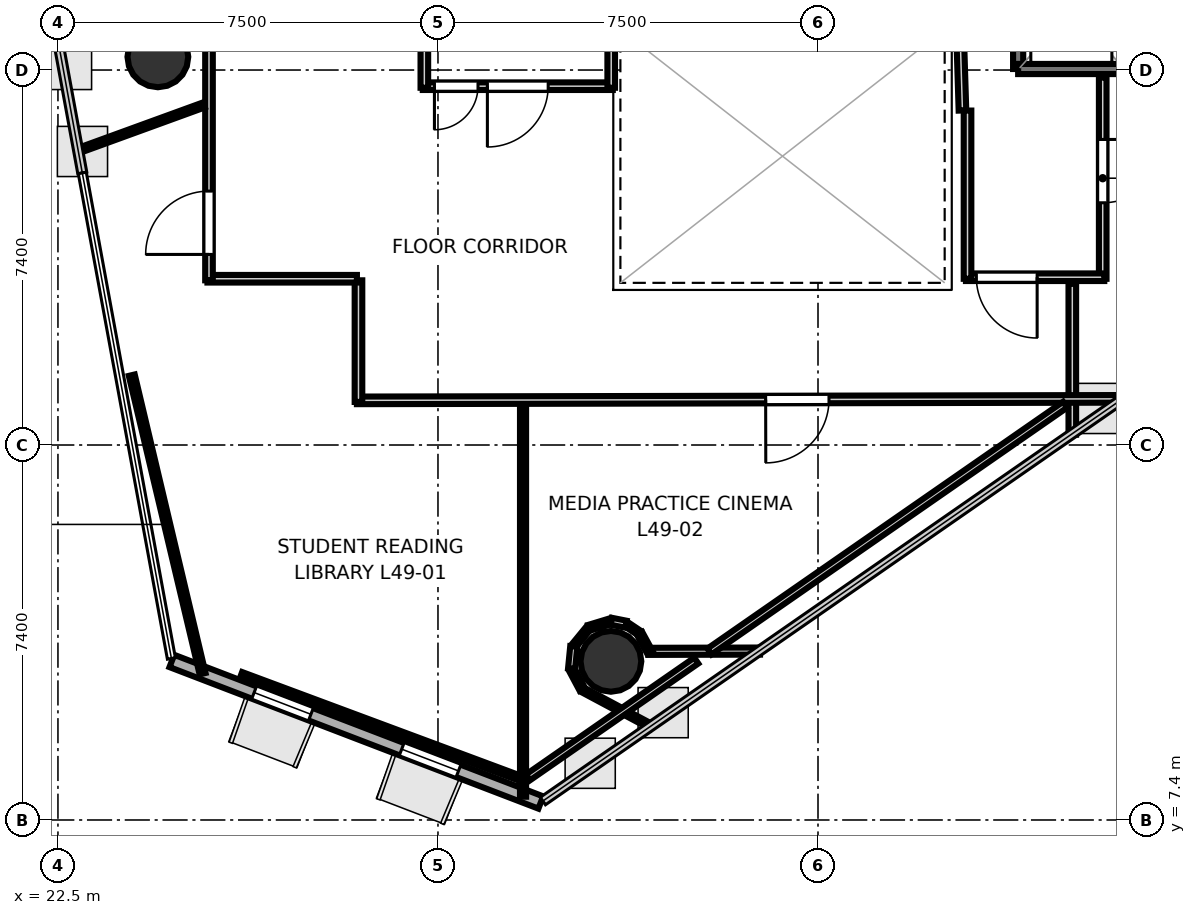
"""IFC4 building model, lengths in metres.
Left out: names, types, materials, properties, quantities, classifications, styles, units other than length and angle.
Written with IfcOpenShell. Run it as: python <this file> out.ifc"""

import sys

from ifc_helpers import new_model, si_unit, direction, frame, frame_2d, origin, origin_2d, place, context, subcontext, project, spatial, rectangle, hollow_circle, extrude, element, fill, save


model = new_model("IFC4")
c1 = context("Model", 3, precision=1e-05, world=origin(), true_north=direction((0.0, 1.0)))
c2 = subcontext(c1, "Body", "Model", "MODEL_VIEW")
j1 = project(units=[si_unit("LENGTHUNIT", "METRE"), si_unit("PLANEANGLEUNIT", "RADIAN")], contexts=[c1])
p1 = place(None, origin())
s1 = spatial("IfcSite", under=j1, at=p1, CompositionType="ELEMENT")
p2 = place(p1, origin())
s2 = spatial("IfcBuilding", under=s1, at=p2, CompositionType="ELEMENT")
p3 = place(p2, frame((0.0, 0.0, 192.9)))
s3 = spatial("IfcBuildingStorey", under=s2, at=p3, CompositionType="ELEMENT", Elevation=192.9)
for number, where, z_axis, x_axis in (
    (1, (24.472, 22.46, 0.0), (0.0, 0.0, 1.0), (1.0, 0.0, 0.0)),
    (2, (33.413, 10.531, 0.0), (0.0, 0.0, 1.0), (1.0, 0.0, 0.0)),
):
    element("IfcColumn", number, at=place(p3, frame(where, z_axis=z_axis, x_axis=x_axis)), inside=s3, PredefinedType="COLUMN", context=c2, shape_type="SweptSolid", body=[
        extrude(hollow_circle(Radius=0.6, WallThickness=0.03, at=origin_2d()), origin(), (0.0, 0.0, 1.0), 3.7),
    ])
p4 = place(p3, frame((24.748, 10.538, 0.0), z_axis=(0.0, 0.0, 1.0), x_axis=(0.933674423382, -0.358122983237, 0.0)))
e3 = element("IfcWall", 3, at=p4, inside=s3, PredefinedType="SOLIDWALL", context=c2, shape_type="SweptSolid", body=[
    extrude(rectangle(XDim=7.798, YDim=0.26, at=frame_2d((3.899, 0.0))), origin(), (0.0, 0.0, 1.0), 3.52),
])
p5 = place(p4, frame((1.74, 0.0, 0.9)))
e4 = element("IfcOpeningElement", 4, at=p5, cuts=e3, PredefinedType="OPENING", context=c2, shape_type="SweptSolid", body=[
    extrude(rectangle(XDim=1.2, YDim=2.0, at=frame_2d((0.6, 1.0))), frame((0.0, 0.14, 0.0), z_axis=(0.0, -1.0, 0.0), x_axis=(1.0, 0.0, 0.0)), (0.0, 0.0, 1.0), 0.28),
])
p6 = place(p4, frame((4.859, 0.0, 0.9)))
e5 = element("IfcOpeningElement", 5, at=p6, cuts=e3, PredefinedType="OPENING", context=c2, shape_type="SweptSolid", body=[
    extrude(rectangle(XDim=1.2, YDim=2.0, at=frame_2d((0.6, 1.0))), frame((0.0, 0.14, 0.0), z_axis=(0.0, -1.0, 0.0), x_axis=(1.0, 0.0, 0.0)), (0.0, 0.0, 1.0), 0.28),
])
p7 = place(p3, frame((41.45, 22.22, 0.0), z_axis=(0.0, 0.0, 1.0), x_axis=(0.0, 1.0, 0.0)))
e6 = element("IfcWall", 6, at=p7, inside=s3, PredefinedType="SOLIDWALL", context=c2, shape_type="SweptSolid", body=[
    extrude(rectangle(XDim=2.36, YDim=0.2, at=frame_2d((1.18, 0.0))), origin(), (0.0, 0.0, 1.0), 3.52),
])
p8 = place(p3, frame((41.45, 22.22, 0.0), z_axis=(0.0, 0.0, 1.0), x_axis=(1.0, 0.0, 0.0)))
e7 = element("IfcWall", 7, at=p8, inside=s3, PredefinedType="SOLIDWALL", context=c2, shape_type="SweptSolid", body=[
    extrude(rectangle(XDim=2.1, YDim=0.2, at=frame_2d((1.05, 0.0))), origin(), (0.0, 0.0, 1.0), 3.52),
])
p9 = place(p3, frame((33.45, 21.881, 0.0), z_axis=(0.0, 0.0, 1.0), x_axis=(-1.0, 0.0, 0.0)))
e8 = element("IfcWall", 8, at=p9, inside=s3, PredefinedType="PARTITIONING", context=c2, shape_type="SweptSolid", body=[
    extrude(rectangle(XDim=3.75, YDim=0.15, at=frame_2d((1.875, 0.0))), origin(), (0.0, 0.0, 1.0), 2.84),
])
p10 = place(p9, frame((1.275, 0.0, 0.0)))
e9 = element("IfcOpeningElement", 9, at=p10, cuts=e8, PredefinedType="OPENING", context=c2, shape_type="SweptSolid", body=[
    extrude(rectangle(XDim=1.2, YDim=2.15, at=frame_2d((0.6, 1.075))), frame((0.0, 0.085, 0.0), z_axis=(0.0, -1.0, 0.0), x_axis=(1.0, 0.0, 0.0)), (0.0, 0.0, 1.0), 0.17),
])
p11 = place(p9, frame((2.66, 0.0, 0.0)))
e10 = element("IfcOpeningElement", 10, at=p11, cuts=e8, PredefinedType="OPENING", context=c2, shape_type="SweptSolid", body=[
    extrude(rectangle(XDim=0.86, YDim=2.05, at=frame_2d((0.43, 1.025))), frame((0.0, 0.085, 0.0), z_axis=(0.0, -1.0, 0.0), x_axis=(1.0, 0.0, 0.0)), (0.0, 0.0, 1.0), 0.17),
])
for number, where, z_axis, x_axis in (
    (11, (29.731, 21.85, 0.0), (0.0, 0.0, 1.0), (0.0, 1.0, 0.0)),
    (12, (33.419, 24.542, 0.0), (0.0, 0.0, 1.0), (0.0, -1.0, 0.0)),
):
    element("IfcWall", number, at=place(p3, frame(where, z_axis=z_axis, x_axis=x_axis)), inside=s3, PredefinedType="PARTITIONING", context=c2, shape_type="SweptSolid", body=[
        extrude(rectangle(XDim=2.692, YDim=0.15, at=frame_2d((1.346, 0.0))), origin(), (0.0, 0.0, 1.0), 2.84),
    ])
p12 = place(p3, frame((40.351, 21.401, 0.0), z_axis=(0.0, 0.0, 1.0), x_axis=(-0.031058045979, 0.999517582527, 0.0)))
e13 = element("IfcWall", 13, at=p12, inside=s3, PredefinedType="PARTITIONING", context=c2, shape_type="SweptSolid", body=[
    extrude(rectangle(XDim=1.682, YDim=0.15, at=frame_2d((0.841, 0.0))), origin(), (0.0, 0.0, 1.0), 2.84),
])
p13 = place(p3, frame((43.119, 22.05, 0.0), z_axis=(0.0, 0.0, 1.0), x_axis=(0.0, -1.0, 0.0)))
e14 = element("IfcWall", 14, at=p13, inside=s3, PredefinedType="PARTITIONING", context=c2, shape_type="SweptSolid", body=[
    extrude(rectangle(XDim=3.97, YDim=0.15, at=frame_2d((1.985, 0.0))), origin(), (0.0, 0.0, 1.0), 2.84),
])
p14 = place(p13, frame((1.22, 0.0, 0.0)))
e15 = element("IfcOpeningElement", 15, at=p14, cuts=e14, PredefinedType="OPENING", context=c2, shape_type="SweptSolid", body=[
    extrude(rectangle(XDim=1.25, YDim=2.2, at=frame_2d((0.625, 1.1))), frame((0.0, 0.085, 0.0), z_axis=(0.0, -1.0, 0.0), x_axis=(1.0, 0.0, 0.0)), (0.0, 0.0, 1.0), 0.17),
])
p15 = place(p3, frame((43.15, 18.111, 0.0), z_axis=(0.0, 0.0, 1.0), x_axis=(-1.0, 0.0, 0.0)))
e16 = element("IfcWall", 16, at=p15, inside=s3, PredefinedType="PARTITIONING", context=c2, shape_type="SweptSolid", body=[
    extrude(rectangle(XDim=2.73, YDim=0.15, at=frame_2d((1.365, 0.0))), origin(), (0.0, 0.0, 1.0), 2.84),
])
p16 = place(p15, frame((1.325, 0.0, 0.0)))
e17 = element("IfcOpeningElement", 17, at=p16, cuts=e16, PredefinedType="OPENING", context=c2, shape_type="SweptSolid", body=[
    extrude(rectangle(XDim=1.2, YDim=2.15, at=frame_2d((0.6, 1.075))), frame((0.0, 0.085, 0.0), z_axis=(0.0, -1.0, 0.0), x_axis=(1.0, 0.0, 0.0)), (0.0, 0.0, 1.0), 0.17),
])
p17 = place(p3, frame((40.451, 18.08, 0.0), z_axis=(0.0, 0.0, 1.0), x_axis=(0.0, 1.0, 0.0)))
e18 = element("IfcWall", 18, at=p17, inside=s3, PredefinedType="PARTITIONING", context=c2, shape_type="SweptSolid", body=[
    extrude(rectangle(XDim=3.32, YDim=0.15, at=frame_2d((1.66, 0.0))), origin(), (0.0, 0.0, 1.0), 2.84),
])
p18 = place(p3, frame((42.519, 17.98, 0.0), z_axis=(0.0, 0.0, 1.0), x_axis=(0.0, -1.0, 0.0)))
e19 = element("IfcWall", 19, at=p18, inside=s3, PredefinedType="PARTITIONING", context=c2, shape_type="SweptSolid", body=[
    extrude(rectangle(XDim=2.977, YDim=0.15, at=frame_2d((1.488, 0.0))), origin(), (0.0, 0.0, 1.0), 2.84),
])
p19 = place(p3, frame((43.53, 15.711, 0.0), z_axis=(0.0, 0.0, 1.0), x_axis=(-0.999998062252, -0.00196862718, 0.0)))
e20 = element("IfcWall", 20, at=p19, inside=s3, PredefinedType="PARTITIONING", context=c2, shape_type="SweptSolid", body=[
    extrude(rectangle(XDim=15.13, YDim=0.15, at=frame_2d((7.565, 0.0))), origin(), (0.0, 0.0, 1.0), 2.84),
])
p20 = place(p19, frame((5.813, 0.0, 0.0)))
e21 = element("IfcOpeningElement", 21, at=p20, cuts=e20, PredefinedType="OPENING", context=c2, shape_type="SweptSolid", body=[
    extrude(rectangle(XDim=1.25, YDim=2.2, at=frame_2d((0.625, 1.1))), frame((0.0, 0.085, 0.0), z_axis=(0.0, -1.0, 0.0), x_axis=(1.0, 0.0, 0.0)), (0.0, 0.0, 1.0), 0.17),
])
p21 = place(p3, frame((28.431, 15.65, 0.0), z_axis=(0.0, 0.0, 1.0), x_axis=(0.0, 1.0, 0.0)))
e22 = element("IfcWall", 22, at=p21, inside=s3, PredefinedType="PARTITIONING", context=c2, shape_type="SweptSolid", body=[
    extrude(rectangle(XDim=2.4, YDim=0.15, at=frame_2d((1.2, 0.0))), origin(), (0.0, 0.0, 1.0), 2.84),
])
p22 = place(p3, frame((28.4, 18.081, 0.0), z_axis=(0.0, 0.0, 1.0), x_axis=(-1.0, 0.0, 0.0)))
e23 = element("IfcWall", 23, at=p22, inside=s3, PredefinedType="PARTITIONING", context=c2, shape_type="SweptSolid", body=[
    extrude(rectangle(XDim=2.95, YDim=0.15, at=frame_2d((1.475, 0.0))), origin(), (0.0, 0.0, 1.0), 2.84),
])
p23 = place(p3, frame((25.481, 18.05, 0.0), z_axis=(0.0, 0.0, 1.0), x_axis=(0.0, 1.0, 0.0)))
e24 = element("IfcWall", 24, at=p23, inside=s3, PredefinedType="PARTITIONING", context=c2, shape_type="SweptSolid", body=[
    extrude(rectangle(XDim=18.219, YDim=0.15, at=frame_2d((9.109, 0.0))), origin(), (0.0, 0.0, 1.0), 2.84),
])
p24 = place(p23, frame((0.511, 0.0, 0.0)))
e25 = element("IfcOpeningElement", 25, at=p24, cuts=e24, PredefinedType="OPENING", context=c2, shape_type="SweptSolid", body=[
    extrude(rectangle(XDim=1.25, YDim=2.2, at=frame_2d((0.625, 1.1))), frame((0.0, 0.085, 0.0), z_axis=(0.0, -1.0, 0.0), x_axis=(1.0, 0.0, 0.0)), (0.0, 0.0, 1.0), 0.17),
])
p25 = place(p23, frame((10.07, 0.0, 0.0)))
e26 = element("IfcOpeningElement", 26, at=p25, cuts=e24, PredefinedType="OPENING", context=c2, shape_type="SweptSolid", body=[
    extrude(rectangle(XDim=0.9, YDim=2.1, at=frame_2d((0.45, 1.05))), frame((0.0, 0.085, 0.0), z_axis=(0.0, -1.0, 0.0), x_axis=(1.0, 0.0, 0.0)), (0.0, 0.0, 1.0), 0.17),
])
p26 = place(p3, frame((25.354, 10.287, 0.0), z_axis=(0.0, 0.0, 1.0), x_axis=(-0.230780881634, 0.973005747502, 0.0)))
e27 = element("IfcWall", 27, at=p26, inside=s3, PredefinedType="PARTITIONING", context=c2, shape_type="SweptSolid", body=[
    extrude(rectangle(XDim=6.054, YDim=0.12, at=frame_2d((3.027, 0.0))), origin(), (0.0, 0.0, 1.0), 2.84),
])
p27 = place(p3, frame((22.881, 20.601, 0.0), z_axis=(0.0, 0.0, 1.0), x_axis=(0.939683512966, 0.342045165819, 0.0)))
e28 = element("IfcWall", 28, at=p27, inside=s3, PredefinedType="PARTITIONING", context=c2, shape_type="SweptSolid", body=[
    extrude(rectangle(XDim=2.66, YDim=0.105, at=frame_2d((1.33, 0.0))), origin(), (0.0, 0.0, 1.0), 2.84),
])
p28 = place(p3, frame((31.679, 15.573, 0.0), z_axis=(0.0, 0.0, 1.0), x_axis=(0.0, -1.0, 0.0)))
e29 = element("IfcWall", 29, at=p28, inside=s3, PredefinedType="PARTITIONING", context=c2, shape_type="SweptSolid", body=[
    extrude(rectangle(XDim=7.713, YDim=0.12, at=frame_2d((3.856, 0.0))), origin(), (0.0, 0.0, 1.0), 2.84),
])
p29 = place(p3, frame((31.721, 8.186, 0.0), z_axis=(0.0, 0.0, 1.0), x_axis=(-0.937280495086, 0.348576065631, 0.0)))
e30 = element("IfcWall", 30, at=p29, inside=s3, PredefinedType="PARTITIONING", context=c2, shape_type="SweptSolid", body=[
    extrude(rectangle(XDim=5.979, YDim=0.105, at=frame_2d((2.99, 0.0))), origin(), (0.0, 0.0, 1.0), 2.84),
])
p30 = place(p3, frame((36.355, 10.733, 0.0), z_axis=(0.0, 0.0, 1.0), x_axis=(-0.999997026912, -0.002438476457, 0.0)))
e31 = element("IfcWall", 31, at=p30, inside=s3, PredefinedType="PARTITIONING", context=c2, shape_type="SweptSolid", body=[
    extrude(rectangle(XDim=2.203, YDim=0.14, at=frame_2d((1.101, 0.0))), origin(), (0.0, 0.0, 1.0), 2.84),
])
p31 = place(p3, frame((34.18, 10.712, 0.0), z_axis=(0.0, 0.0, 1.0), x_axis=(-0.47901386463, 0.877807335064, 0.0)))
e32 = element("IfcWall", 32, at=p31, inside=s3, PredefinedType="PARTITIONING", context=c2, shape_type="SweptSolid", body=[
    extrude(rectangle(XDim=0.423, YDim=0.12, at=frame_2d((0.211, 0.0))), origin(), (0.0, 0.0, 1.0), 2.84),
])
p32 = place(p3, frame((33.968, 11.094, 0.0), z_axis=(0.0, 0.0, 1.0), x_axis=(-0.831542792322, 0.555460695763, 0.0)))
e33 = element("IfcWall", 33, at=p32, inside=s3, PredefinedType="PARTITIONING", context=c2, shape_type="SweptSolid", body=[
    extrude(rectangle(XDim=0.296, YDim=0.105, at=frame_2d((0.148, 0.0))), origin(), (0.0, 0.0, 1.0), 2.84),
])
p33 = place(p3, frame((33.71, 11.264, 0.0), z_axis=(0.0, 0.0, 1.0), x_axis=(-0.980958660601, 0.194216647569, 0.0)))
e34 = element("IfcWall", 34, at=p33, inside=s3, PredefinedType="PARTITIONING", context=c2, shape_type="SweptSolid", body=[
    extrude(rectangle(XDim=0.297, YDim=0.14, at=frame_2d((0.148, 0.0))), origin(), (0.0, 0.0, 1.0), 2.84),
])
p34 = place(p3, frame((33.404, 11.321, 0.0), z_axis=(0.0, 0.0, 1.0), x_axis=(-0.9569080268, -0.290391164202, 0.0)))
e35 = element("IfcWall", 35, at=p34, inside=s3, PredefinedType="PARTITIONING", context=c2, shape_type="SweptSolid", body=[
    extrude(rectangle(XDim=0.441, YDim=0.12, at=frame_2d((0.221, 0.0))), origin(), (0.0, 0.0, 1.0), 2.84),
])
p35 = place(p3, frame((32.967, 11.183, 0.0), z_axis=(0.0, 0.0, 1.0), x_axis=(-0.634231799198, -0.773142952426, 0.0)))
e36 = element("IfcWall", 36, at=p35, inside=s3, PredefinedType="PARTITIONING", context=c2, shape_type="SweptSolid", body=[
    extrude(rectangle(XDim=0.441, YDim=0.105, at=frame_2d((0.221, 0.0))), origin(), (0.0, 0.0, 1.0), 2.84),
])
p36 = place(p3, frame((32.68, 10.825, 0.0), z_axis=(0.0, 0.0, 1.0), x_axis=(-0.097915215421, -0.995194760129, 0.0)))
e37 = element("IfcWall", 37, at=p36, inside=s3, PredefinedType="PARTITIONING", context=c2, shape_type="SweptSolid", body=[
    extrude(rectangle(XDim=0.441, YDim=0.14, at=frame_2d((0.221, 0.0))), origin(), (0.0, 0.0, 1.0), 2.84),
])
p37 = place(p3, frame((32.64, 10.368, 0.0), z_axis=(0.0, 0.0, 1.0), x_axis=(0.471392110461, -0.881923737177, 0.0)))
e38 = element("IfcWall", 38, at=p37, inside=s3, PredefinedType="PARTITIONING", context=c2, shape_type="SweptSolid", body=[
    extrude(rectangle(XDim=0.441, YDim=0.12, at=frame_2d((0.221, 0.0))), origin(), (0.0, 0.0, 1.0), 2.84),
])
p38 = place(p3, frame((32.861, 9.966, 0.0), z_axis=(0.0, 0.0, 1.0), x_axis=(0.881895233193, -0.471445434459, 0.0)))
e39 = element("IfcWall", 39, at=p38, inside=s3, PredefinedType="PARTITIONING", context=c2, shape_type="SweptSolid", body=[
    extrude(rectangle(XDim=1.537, YDim=0.105, at=frame_2d((0.769, 0.0))), origin(), (0.0, 0.0, 1.0), 2.84),
])
p39 = place(p3, frame((35.097, 10.545, 0.0), z_axis=(0.0, 0.0, 1.0), x_axis=(-0.821611206255, -0.570048266164, 0.0)))
e40 = element("IfcWall", 40, at=p39, inside=s3, PredefinedType="PARTITIONING", context=c2, shape_type="SweptSolid", body=[
    extrude(rectangle(XDim=4.042, YDim=0.14, at=frame_2d((2.021, 0.0))), origin(), (0.0, 0.0, 1.0), 2.84),
])
p40 = place(p3, frame((42.377, 15.595, 0.0), z_axis=(0.0, 0.0, 1.0), x_axis=(-0.821614609727, -0.570043360704, 0.0)))
e41 = element("IfcWall", 41, at=p40, inside=s3, PredefinedType="PARTITIONING", context=c2, shape_type="SweptSolid", body=[
    extrude(rectangle(XDim=8.543, YDim=0.14, at=frame_2d((4.271, 0.0))), origin(), (0.0, 0.0, 1.0), 2.84),
])
p41 = place(p10, origin())
e42 = element("IfcDoor", 42, at=p41, inside=s3, OperationType="SINGLE_SWING_RIGHT", PredefinedType="DOOR", context=c2, shape_type="SweptSolid", body=[
    extrude(rectangle(XDim=1.2, YDim=2.15, at=frame_2d((0.6, 1.075))), frame((0.0, 0.025, 0.0), z_axis=(0.0, -1.0, 0.0), x_axis=(1.0, 0.0, 0.0)), (0.0, 0.0, 1.0), 0.05),
])
fill(e9, e42)
p42 = place(p16, origin())
e43 = element("IfcDoor", 43, at=p42, inside=s3, OperationType="SINGLE_SWING_LEFT", PredefinedType="DOOR", context=c2, shape_type="SweptSolid", body=[
    extrude(rectangle(XDim=1.2, YDim=2.15, at=frame_2d((0.6, 1.075))), frame((0.0, 0.025, 0.0), z_axis=(0.0, -1.0, 0.0), x_axis=(1.0, 0.0, 0.0)), (0.0, 0.0, 1.0), 0.05),
])
fill(e17, e43)
p43 = place(p11, origin())
e44 = element("IfcDoor", 44, at=p43, inside=s3, OperationType="SINGLE_SWING_RIGHT", PredefinedType="DOOR", context=c2, shape_type="SweptSolid", body=[
    extrude(rectangle(XDim=0.86, YDim=2.05, at=frame_2d((0.43, 1.025))), frame((0.0, 0.025, 0.0), z_axis=(0.0, -1.0, 0.0), x_axis=(1.0, 0.0, 0.0)), (0.0, 0.0, 1.0), 0.05),
])
fill(e10, e44)
p44 = place(p24, origin())
e45 = element("IfcDoor", 45, at=p44, inside=s3, OperationType="SINGLE_SWING_LEFT", PredefinedType="DOOR", context=c2, shape_type="SweptSolid", body=[
    extrude(rectangle(XDim=1.25, YDim=2.2, at=frame_2d((0.625, 1.1))), frame((0.0, 0.025, 0.0), z_axis=(0.0, -1.0, 0.0), x_axis=(1.0, 0.0, 0.0)), (0.0, 0.0, 1.0), 0.05),
])
fill(e25, e45)
p45 = place(p20, origin())
e46 = element("IfcDoor", 46, at=p45, inside=s3, OperationType="SINGLE_SWING_RIGHT", PredefinedType="DOOR", context=c2, shape_type="SweptSolid", body=[
    extrude(rectangle(XDim=1.25, YDim=2.2, at=frame_2d((0.625, 1.1))), frame((0.0, 0.025, 0.0), z_axis=(0.0, -1.0, 0.0), x_axis=(1.0, 0.0, 0.0)), (0.0, 0.0, 1.0), 0.05),
])
fill(e21, e46)
p46 = place(p14, origin())
e47 = element("IfcDoor", 47, at=p46, inside=s3, OperationType="SINGLE_SWING_LEFT", PredefinedType="DOOR", context=c2, shape_type="SweptSolid", body=[
    extrude(rectangle(XDim=1.25, YDim=2.2, at=frame_2d((0.625, 1.1))), frame((0.0, 0.025, 0.0), z_axis=(0.0, -1.0, 0.0), x_axis=(1.0, 0.0, 0.0)), (0.0, 0.0, 1.0), 0.05),
])
fill(e15, e47)
p47 = place(p5, origin())
e48 = element("IfcWindow", 48, at=p47, inside=s3, PartitioningType="SINGLE_PANEL", PredefinedType="WINDOW", context=c2, shape_type="SweptSolid", body=[
    extrude(rectangle(XDim=1.2, YDim=2.0, at=frame_2d((0.6, 1.0))), frame((0.0, 0.03, 0.0), z_axis=(0.0, -1.0, 0.0), x_axis=(1.0, 0.0, 0.0)), (0.0, 0.0, 1.0), 0.06),
])
fill(e4, e48)
p48 = place(p6, origin())
e49 = element("IfcWindow", 49, at=p48, inside=s3, PartitioningType="SINGLE_PANEL", PredefinedType="WINDOW", context=c2, shape_type="SweptSolid", body=[
    extrude(rectangle(XDim=1.2, YDim=2.0, at=frame_2d((0.6, 1.0))), frame((0.0, 0.03, 0.0), z_axis=(0.0, -1.0, 0.0), x_axis=(1.0, 0.0, 0.0)), (0.0, 0.0, 1.0), 0.06),
])
fill(e5, e49)
save(model, sys.argv[1])
